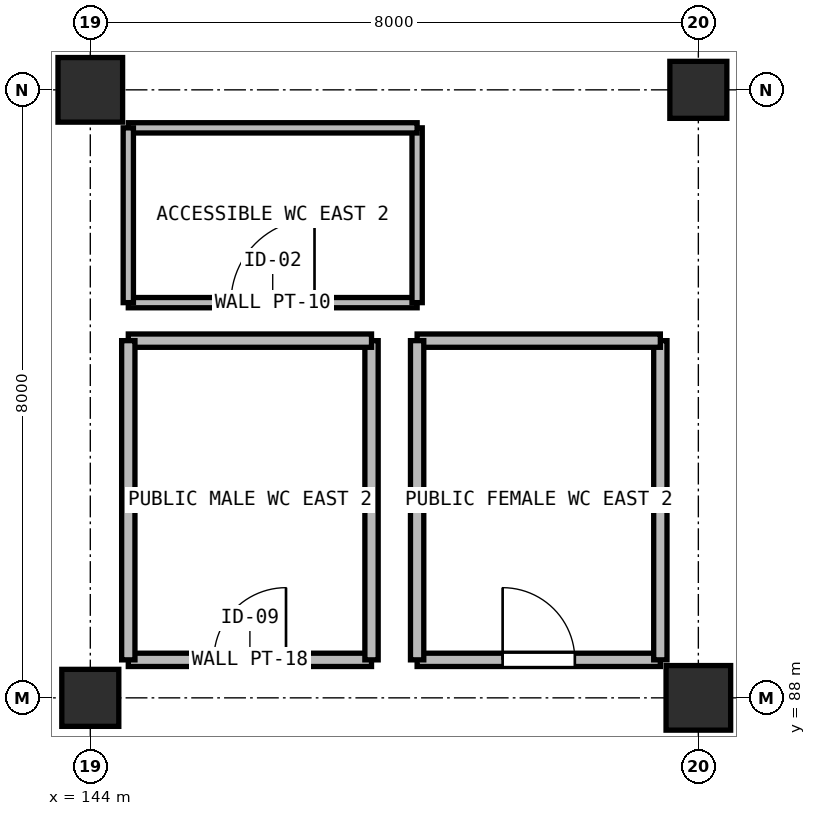
"""IFC4 building model, lengths in metres.
Left out: names, types, materials, properties, quantities, classifications, styles, units other than length and angle.
Written with IfcOpenShell. Run it as: python <this file> out.ifc"""

import sys

from ifc_helpers import new_model, si_unit, direction, frame, frame_2d, origin, origin_2d, place, context, subcontext, project, spatial, rectangle, extrude, element, fill, save


model = new_model("IFC4")
c1 = context("Model", 3, precision=1e-05, world=origin(), true_north=direction((0.0, 1.0)))
c2 = subcontext(c1, "Body", "Model", "MODEL_VIEW")
j1 = project(units=[si_unit("LENGTHUNIT", "METRE"), si_unit("PLANEANGLEUNIT", "RADIAN")], contexts=[c1])
p1 = place(None, origin())
s1 = spatial("IfcSite", under=j1, at=p1, CompositionType="ELEMENT")
p2 = place(p1, origin())
s2 = spatial("IfcBuilding", under=s1, at=p2, CompositionType="ELEMENT")
p3 = place(p2, frame((0.0, 0.0, -4.8)))
s3 = spatial("IfcBuildingStorey", under=s2, at=p3, CompositionType="ELEMENT", Elevation=-4.8)
p4 = place(p3, frame((144.0, 88.0, 0.0), z_axis=(0.0, 0.0, 1.0), x_axis=(1.0, 0.0, 0.0)))
e1 = element("IfcColumn", 1, at=p4, inside=s3, PredefinedType="COLUMN", context=c2, shape_type="SweptSolid", body=[
    extrude(rectangle(XDim=0.75, YDim=0.75, at=origin_2d()), origin(), (0.0, 0.0, 1.0), 4.8),
])
for number, where, z_axis, x_axis in (
    (2, (144.0, 96.0, 0.0), (0.0, 0.0, 1.0), (1.0, 0.0, 0.0)),
    (3, (152.0, 88.0, 0.0), (0.0, 0.0, 1.0), (1.0, 0.0, 0.0)),
):
    element("IfcColumn", number, at=place(p3, frame(where, z_axis=z_axis, x_axis=x_axis)), inside=s3, PredefinedType="COLUMN", context=c2, shape_type="SweptSolid", body=[
        extrude(rectangle(XDim=0.85, YDim=0.85, at=origin_2d()), origin(), (0.0, 0.0, 1.0), 4.8),
    ])
p5 = place(p3, frame((152.0, 96.0, 0.0), z_axis=(0.0, 0.0, 1.0), x_axis=(1.0, 0.0, 0.0)))
e4 = element("IfcColumn", 4, at=p5, inside=s3, PredefinedType="COLUMN", context=c2, shape_type="SweptSolid", body=[
    extrude(rectangle(XDim=0.75, YDim=0.75, at=origin_2d()), origin(), (0.0, 0.0, 1.0), 4.8),
])
p6 = place(p3, frame((144.5, 88.5, 0.0), z_axis=(0.0, 0.0, 1.0), x_axis=(1.0, 0.0, 0.0)))
e5 = element("IfcWall", 5, at=p6, inside=s3, PredefinedType="PARTITIONING", context=c2, shape_type="SweptSolid", body=[
    extrude(rectangle(XDim=3.2, YDim=0.175, at=frame_2d((1.6, 0.0))), origin(), (0.0, 0.0, 1.0), 3.25),
])
p7 = place(p6, frame((1.125, 0.0, 0.0)))
e6 = element("IfcOpeningElement", 6, at=p7, cuts=e5, PredefinedType="OPENING", context=c2, shape_type="SweptSolid", body=[
    extrude(rectangle(XDim=0.95, YDim=2.15, at=frame_2d((0.475, 1.075))), frame((0.0, 0.098, 0.0), z_axis=(0.0, -1.0, 0.0), x_axis=(1.0, 0.0, 0.0)), (0.0, 0.0, 1.0), 0.195),
])
p8 = place(p3, frame((147.7, 88.5, 0.0), z_axis=(0.0, 0.0, 1.0), x_axis=(0.0, 1.0, 0.0)))
e7 = element("IfcWall", 7, at=p8, inside=s3, PredefinedType="PARTITIONING", context=c2, shape_type="SweptSolid", body=[
    extrude(rectangle(XDim=4.2, YDim=0.175, at=frame_2d((2.1, 0.0))), origin(), (0.0, 0.0, 1.0), 4.46),
])
p9 = place(p3, frame((147.7, 92.7, 0.0), z_axis=(0.0, 0.0, 1.0), x_axis=(-1.0, 0.0, 0.0)))
e8 = element("IfcWall", 8, at=p9, inside=s3, PredefinedType="PARTITIONING", context=c2, shape_type="SweptSolid", body=[
    extrude(rectangle(XDim=3.2, YDim=0.175, at=frame_2d((1.6, 0.0))), origin(), (0.0, 0.0, 1.0), 4.0),
])
p10 = place(p3, frame((144.5, 92.7, 0.0), z_axis=(0.0, 0.0, 1.0), x_axis=(0.0, -1.0, 0.0)))
e9 = element("IfcWall", 9, at=p10, inside=s3, PredefinedType="PARTITIONING", context=c2, shape_type="SweptSolid", body=[
    extrude(rectangle(XDim=4.2, YDim=0.175, at=frame_2d((2.1, 0.0))), origin(), (0.0, 0.0, 1.0), 3.45),
])
p11 = place(p3, frame((148.3, 88.5, 0.0), z_axis=(0.0, 0.0, 1.0), x_axis=(1.0, 0.0, 0.0)))
e10 = element("IfcWall", 10, at=p11, inside=s3, PredefinedType="PARTITIONING", context=c2, shape_type="SweptSolid", body=[
    extrude(rectangle(XDim=3.2, YDim=0.175, at=frame_2d((1.6, 0.0))), origin(), (0.0, 0.0, 1.0), 3.25),
])
p12 = place(p11, frame((1.125, 0.0, 0.0)))
e11 = element("IfcOpeningElement", 11, at=p12, cuts=e10, PredefinedType="OPENING", context=c2, shape_type="SweptSolid", body=[
    extrude(rectangle(XDim=0.95, YDim=2.15, at=frame_2d((0.475, 1.075))), frame((0.0, 0.098, 0.0), z_axis=(0.0, -1.0, 0.0), x_axis=(1.0, 0.0, 0.0)), (0.0, 0.0, 1.0), 0.195),
])
p13 = place(p3, frame((151.5, 88.5, 0.0), z_axis=(0.0, 0.0, 1.0), x_axis=(0.0, 1.0, 0.0)))
e12 = element("IfcWall", 12, at=p13, inside=s3, PredefinedType="PARTITIONING", context=c2, shape_type="SweptSolid", body=[
    extrude(rectangle(XDim=4.2, YDim=0.175, at=frame_2d((2.1, 0.0))), origin(), (0.0, 0.0, 1.0), 3.45),
])
p14 = place(p3, frame((151.5, 92.7, 0.0), z_axis=(0.0, 0.0, 1.0), x_axis=(-1.0, 0.0, 0.0)))
e13 = element("IfcWall", 13, at=p14, inside=s3, PredefinedType="PARTITIONING", context=c2, shape_type="SweptSolid", body=[
    extrude(rectangle(XDim=3.2, YDim=0.175, at=frame_2d((1.6, 0.0))), origin(), (0.0, 0.0, 1.0), 4.0),
])
p15 = place(p3, frame((148.3, 92.7, 0.0), z_axis=(0.0, 0.0, 1.0), x_axis=(0.0, -1.0, 0.0)))
e14 = element("IfcWall", 14, at=p15, inside=s3, PredefinedType="PARTITIONING", context=c2, shape_type="SweptSolid", body=[
    extrude(rectangle(XDim=4.2, YDim=0.175, at=frame_2d((2.1, 0.0))), origin(), (0.0, 0.0, 1.0), 4.46),
])
p16 = place(p3, frame((144.5, 93.2, 0.0), z_axis=(0.0, 0.0, 1.0), x_axis=(1.0, 0.0, 0.0)))
e15 = element("IfcWall", 15, at=p16, inside=s3, PredefinedType="PARTITIONING", context=c2, shape_type="SweptSolid", body=[
    extrude(rectangle(XDim=3.8, YDim=0.135, at=frame_2d((1.9, 0.0))), origin(), (0.0, 0.0, 1.0), 4.46),
])
p17 = place(p16, frame((1.35, 0.0, 0.0)))
e16 = element("IfcOpeningElement", 16, at=p17, cuts=e15, PredefinedType="OPENING", context=c2, shape_type="SweptSolid", body=[
    extrude(rectangle(XDim=1.1, YDim=2.15, at=frame_2d((0.55, 1.075))), frame((0.0, 0.078, 0.0), z_axis=(0.0, -1.0, 0.0), x_axis=(1.0, 0.0, 0.0)), (0.0, 0.0, 1.0), 0.155),
])
p18 = place(p3, frame((148.3, 93.2, 0.0), z_axis=(0.0, 0.0, 1.0), x_axis=(0.0, 1.0, 0.0)))
e17 = element("IfcWall", 17, at=p18, inside=s3, PredefinedType="PARTITIONING", context=c2, shape_type="SweptSolid", body=[
    extrude(rectangle(XDim=2.3, YDim=0.135, at=frame_2d((1.15, 0.0))), origin(), (0.0, 0.0, 1.0), 4.46),
])
p19 = place(p3, frame((148.3, 95.5, 0.0), z_axis=(0.0, 0.0, 1.0), x_axis=(-1.0, 0.0, 0.0)))
e18 = element("IfcWall", 18, at=p19, inside=s3, PredefinedType="PARTITIONING", context=c2, shape_type="SweptSolid", body=[
    extrude(rectangle(XDim=3.8, YDim=0.135, at=frame_2d((1.9, 0.0))), origin(), (0.0, 0.0, 1.0), 3.25),
])
p20 = place(p3, frame((144.5, 95.5, 0.0), z_axis=(0.0, 0.0, 1.0), x_axis=(0.0, -1.0, 0.0)))
e19 = element("IfcWall", 19, at=p20, inside=s3, PredefinedType="PARTITIONING", context=c2, shape_type="SweptSolid", body=[
    extrude(rectangle(XDim=2.3, YDim=0.135, at=frame_2d((1.15, 0.0))), origin(), (0.0, 0.0, 1.0), 3.45),
])
p21 = place(p7, origin())
e20 = element("IfcDoor", 20, at=p21, inside=s3, OperationType="SINGLE_SWING_RIGHT", PredefinedType="DOOR", context=c2, shape_type="SweptSolid", body=[
    extrude(rectangle(XDim=0.95, YDim=2.15, at=frame_2d((0.475, 1.075))), frame((0.0, 0.025, 0.0), z_axis=(0.0, -1.0, 0.0), x_axis=(1.0, 0.0, 0.0)), (0.0, 0.0, 1.0), 0.05),
])
fill(e6, e20)
p22 = place(p12, origin())
e21 = element("IfcDoor", 21, at=p22, inside=s3, OperationType="SINGLE_SWING_LEFT", PredefinedType="DOOR", context=c2, shape_type="SweptSolid", body=[
    extrude(rectangle(XDim=0.95, YDim=2.15, at=frame_2d((0.475, 1.075))), frame((0.0, 0.025, 0.0), z_axis=(0.0, -1.0, 0.0), x_axis=(1.0, 0.0, 0.0)), (0.0, 0.0, 1.0), 0.05),
])
fill(e11, e21)
p23 = place(p17, origin())
e22 = element("IfcDoor", 22, at=p23, inside=s3, OperationType="SINGLE_SWING_RIGHT", PredefinedType="DOOR", context=c2, shape_type="SweptSolid", body=[
    extrude(rectangle(XDim=1.1, YDim=2.15, at=frame_2d((0.55, 1.075))), frame((0.0, 0.025, 0.0), z_axis=(0.0, -1.0, 0.0), x_axis=(1.0, 0.0, 0.0)), (0.0, 0.0, 1.0), 0.05),
])
fill(e16, e22)
save(model, sys.argv[1])
